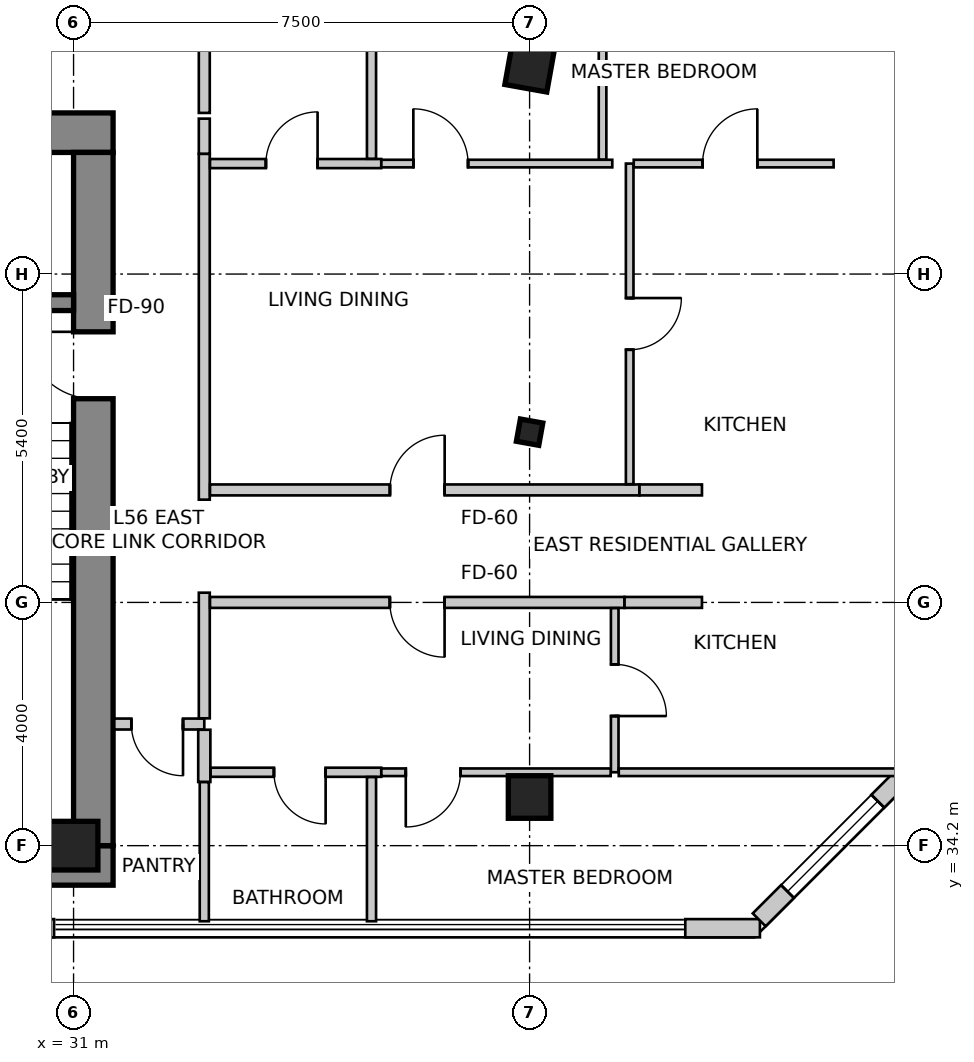
"""IFC4 building model, lengths in metres.
Left out: names, types, materials, properties, quantities, classifications, styles, units other than length and angle.
Written with IfcOpenShell. Run it as: python <this file> out.ifc"""

import sys

from ifc_helpers import new_model, si_unit, direction, frame, frame_2d, origin, origin_2d, place, context, subcontext, project, spatial, rectangle, i_section, extrude, source, transform, mapped, element, fill, save


model = new_model("IFC4")
c1 = context("Model", 3, precision=1e-05, world=origin(), true_north=direction((0.0, 1.0)))
c2 = subcontext(c1, "Body", "Model", "MODEL_VIEW")
j1 = project(units=[si_unit("LENGTHUNIT", "METRE"), si_unit("PLANEANGLEUNIT", "RADIAN")], contexts=[c1])
p1 = place(None, origin())
s1 = spatial("IfcSite", under=j1, at=p1, CompositionType="ELEMENT")
p2 = place(p1, origin())
s2 = spatial("IfcBuilding", under=s1, at=p2, CompositionType="ELEMENT")
p3 = place(p2, frame((0.0, 0.0, 221.9)))
s3 = spatial("IfcBuildingStorey", under=s2, at=p3, CompositionType="ELEMENT", Elevation=221.9)
p4 = place(p3, frame((15.95, 45.925, 0.0), z_axis=(0.0, 0.0, 1.0), x_axis=(1.0, 0.0, 0.0)))
e1 = element("IfcWall", 1, at=p4, inside=s3, PredefinedType="SHEAR", context=c2, shape_type="SweptSolid", body=[
    extrude(rectangle(XDim=15.7, YDim=0.65, at=frame_2d((7.85, 0.0))), origin(), (0.0, 0.0, 1.0), 3.5),
])
p5 = place(p3, frame((15.95, 33.875, 0.0), z_axis=(0.0, 0.0, 1.0), x_axis=(1.0, 0.0, 0.0)))
e2 = element("IfcWall", 2, at=p5, inside=s3, PredefinedType="SHEAR", context=c2, shape_type="SweptSolid", body=[
    extrude(rectangle(XDim=15.7, YDim=0.65, at=frame_2d((7.85, 0.0))), origin(), (0.0, 0.0, 1.0), 3.5),
])
m1 = source(origin(), c2, "Body", "SweptSolid", [
    extrude(rectangle(XDim=1.1, YDim=2.15, at=frame_2d((0.55, 1.075))), frame((0.0, 0.335, 0.0), z_axis=(0.0, -1.0, 0.0), x_axis=(1.0, 0.0, 0.0)), (0.0, 0.0, 1.0), 0.67),
])
p6 = place(p5, frame((10.08, 0.0, 0.0)))
e3 = element("IfcOpeningElement", 3, at=p6, cuts=e2, PredefinedType="OPENING", context=c2, shape_type="MappedRepresentation", body=[
    mapped(m1, transform((0.0, 0.0, 0.0), scale=1.0)),
])
p7 = place(p3, frame((31.325, 34.2, 0.0), z_axis=(0.0, 0.0, 1.0), x_axis=(0.0, 1.0, 0.0)))
e4 = element("IfcWall", 4, at=p7, inside=s3, PredefinedType="SHEAR", context=c2, shape_type="SweptSolid", body=[
    extrude(rectangle(XDim=11.4, YDim=0.65, at=frame_2d((5.7, 0.0))), origin(), (0.0, 0.0, 1.0), 3.5),
])
p8 = place(p7, frame((7.35, 0.0, 0.0)))
e5 = element("IfcOpeningElement", 5, at=p8, cuts=e4, PredefinedType="OPENING", context=c2, shape_type="MappedRepresentation", body=[
    mapped(m1, transform((0.0, 0.0, 0.0), scale=1.0)),
])
p9 = place(p3, frame((27.5, 43.13, 0.0), z_axis=(0.0, 0.0, 1.0), x_axis=(1.0, 0.0, 0.0)))
e6 = element("IfcWall", 6, at=p9, inside=s3, PredefinedType="SHEAR", context=c2, shape_type="SweptSolid", body=[
    extrude(rectangle(XDim=3.5, YDim=0.26, at=frame_2d((1.75, 0.0))), origin(), (0.0, 0.0, 1.0), 3.5),
])
m2 = source(origin(), c2, "Body", "SweptSolid", [
    extrude(rectangle(XDim=0.7, YDim=0.7, at=origin_2d()), origin(), (0.0, 0.0, 1.0), 3.5),
])
p10 = place(p3, frame((38.5, 47.0, 0.0), z_axis=(0.0, 0.0, 1.0), x_axis=(0.984195607969, -0.17708474032, 0.0)))
e7 = element("IfcColumn", 7, at=p10, inside=s3, PredefinedType="COLUMN", context=c2, shape_type="MappedRepresentation", body=[
    mapped(m2, transform((0.0, 0.0, 0.0), scale=1.0)),
])
m3 = source(origin(), c2, "Body", "SweptSolid", [
    extrude(rectangle(XDim=0.8, YDim=0.8, at=origin_2d()), origin(), (0.0, 0.0, 1.0), 3.5),
])
p11 = place(p3, frame((31.0, 34.2, 0.0), z_axis=(0.0, 0.0, 1.0), x_axis=(1.0, 0.0, 0.0)))
e8 = element("IfcColumn", 8, at=p11, inside=s3, PredefinedType="COLUMN", context=c2, shape_type="MappedRepresentation", body=[
    mapped(m3, transform((0.0, 0.0, 0.0), scale=1.0)),
])
p12 = place(p3, frame((38.5, 35.0, 0.0), z_axis=(0.0, 0.0, 1.0), x_axis=(1.0, 0.0, 0.0)))
e9 = element("IfcColumn", 9, at=p12, inside=s3, PredefinedType="COLUMN", context=c2, shape_type="MappedRepresentation", body=[
    mapped(m2, transform((0.0, 0.0, 0.0), scale=1.0)),
])
m4 = source(origin(), c2, "Body", "SweptSolid", [
    extrude(i_section(OverallWidth=0.374, OverallDepth=0.372, WebThickness=0.016, FlangeThickness=0.026, FilletRadius=0.015, at=origin_2d()), origin(), (0.0, 0.0, 1.0), 3.5),
])
p13 = place(p3, frame((38.5, 41.0, 0.0), z_axis=(0.0, 0.0, 1.0), x_axis=(0.984195607969, -0.17708474032, 0.0)))
e10 = element("IfcColumn", 10, at=p13, inside=s3, PredefinedType="COLUMN", context=c2, shape_type="MappedRepresentation", body=[
    mapped(m4, transform((0.0, 0.0, 0.0), scale=1.0)),
])
p14 = place(p3, frame((29.797, 32.842, 0.0), z_axis=(0.0, 0.0, 1.0), x_axis=(1.0, 0.0, 0.0)))
e11 = element("IfcWall", 11, at=p14, inside=s3, PredefinedType="SOLIDWALL", context=c2, shape_type="SweptSolid", body=[
    extrude(rectangle(XDim=0.882, YDim=0.3, at=frame_2d((0.441, 0.0))), origin(), (0.0, 0.0, 1.0), 3.25),
])
p15 = place(p3, frame((41.06, 32.842, 0.0), z_axis=(0.0, 0.0, 1.0), x_axis=(1.0, 0.0, 0.0)))
e12 = element("IfcWall", 12, at=p15, inside=s3, PredefinedType="SOLIDWALL", context=c2, shape_type="SweptSolid", body=[
    extrude(rectangle(XDim=1.228, YDim=0.3, at=frame_2d((0.614, 0.0))), origin(), (0.0, 0.0, 1.0), 3.25),
])
p16 = place(p3, frame((42.276, 32.98, 0.0), z_axis=(0.0, 0.0, 1.0), x_axis=(0.707106781187, 0.707106781187, 0.0)))
e13 = element("IfcWall", 13, at=p16, inside=s3, PredefinedType="SOLIDWALL", context=c2, shape_type="SweptSolid", body=[
    extrude(rectangle(XDim=4.922, YDim=0.3, at=frame_2d((2.461, 0.0))), origin(), (0.0, 0.0, 1.0), 3.25),
])
m5 = source(origin(), c2, "Body", "SweptSolid", [
    extrude(rectangle(XDim=2.1, YDim=2.0, at=frame_2d((1.05, 1.0))), frame((0.0, 0.16, 0.0), z_axis=(0.0, -1.0, 0.0), x_axis=(1.0, 0.0, 0.0)), (0.0, 0.0, 1.0), 0.32),
])
p17 = place(p16, frame((0.659, 0.0, 0.85)))
e14 = element("IfcOpeningElement", 14, at=p17, cuts=e13, PredefinedType="OPENING", context=c2, shape_type="MappedRepresentation", body=[
    mapped(m5, transform((0.0, 0.0, 0.0), scale=1.0)),
])
p18 = place(p3, frame((45.512, 47.268, 0.0), z_axis=(0.0, 0.0, 1.0), x_axis=(-0.707106781187, 0.707106781187, 0.0)))
e15 = element("IfcWall", 15, at=p18, inside=s3, PredefinedType="SOLIDWALL", context=c2, shape_type="SweptSolid", body=[
    extrude(rectangle(XDim=2.674, YDim=0.3, at=frame_2d((1.337, 0.0))), origin(), (0.0, 0.0, 1.0), 3.25),
])
m6 = source(origin(), c2, "Body", "SweptSolid", [
    extrude(rectangle(XDim=1.5, YDim=1.8, at=frame_2d((0.75, 0.9))), frame((0.0, 0.16, 0.0), z_axis=(0.0, -1.0, 0.0), x_axis=(1.0, 0.0, 0.0)), (0.0, 0.0, 1.0), 0.32),
])
p19 = place(p18, frame((0.587, 0.0, 0.85)))
e16 = element("IfcOpeningElement", 16, at=p19, cuts=e15, PredefinedType="OPENING", context=c2, shape_type="MappedRepresentation", body=[
    mapped(m6, transform((0.0, 0.0, 0.0), scale=1.0)),
])
p20 = place(p3, frame((33.15, 47.706, 0.0), z_axis=(0.0, 0.0, 1.0), x_axis=(0.0, -1.0, 0.0)))
e17 = element("IfcWall", 17, at=p20, inside=s3, PredefinedType="PARTITIONING", context=c2, shape_type="SweptSolid", body=[
    extrude(rectangle(XDim=1.456, YDim=0.18, at=frame_2d((0.728, 0.0))), origin(), (0.0, 0.0, 1.0), 2.934),
])
p21 = place(p3, frame((33.15, 36.2, 0.0), z_axis=(0.0, 0.0, 1.0), x_axis=(-1.0, 0.0, 0.0)))
e18 = element("IfcWall", 18, at=p21, inside=s3, PredefinedType="PARTITIONING", context=c2, shape_type="SweptSolid", body=[
    extrude(rectangle(XDim=1.48, YDim=0.18, at=frame_2d((0.74, 0.0))), origin(), (0.0, 0.0, 1.0), 3.25),
])
m7 = source(origin(), c2, "Body", "SweptSolid", [
    extrude(rectangle(XDim=0.85, YDim=2.15, at=frame_2d((0.425, 1.075))), frame((0.0, 0.1, 0.0), z_axis=(0.0, -1.0, 0.0), x_axis=(1.0, 0.0, 0.0)), (0.0, 0.0, 1.0), 0.2),
])
p22 = place(p21, frame((0.35, 0.0, 0.0)))
e19 = element("IfcOpeningElement", 19, at=p22, cuts=e18, PredefinedType="OPENING", context=c2, shape_type="MappedRepresentation", body=[
    mapped(m7, transform((0.0, 0.0, 0.0), scale=1.0)),
])
p23 = place(p3, frame((33.15, 45.577, 0.0), z_axis=(0.0, 0.0, 1.0), x_axis=(0.0, -1.0, 0.0)))
e20 = element("IfcWall", 20, at=p23, inside=s3, PredefinedType="PARTITIONING", context=c2, shape_type="SweptSolid", body=[
    extrude(rectangle(XDim=5.687, YDim=0.18, at=frame_2d((2.844, 0.0))), origin(), (0.0, 0.0, 1.0), 2.822),
])
p24 = place(p3, frame((33.15, 46.156, 0.0), z_axis=(0.0, 0.0, 1.0), x_axis=(0.0, -1.0, 0.0)))
e21 = element("IfcWall", 21, at=p24, inside=s3, PredefinedType="PARTITIONING", context=c2, shape_type="SweptSolid", body=[
    extrude(rectangle(XDim=0.577, YDim=0.18, at=frame_2d((0.289, 0.0))), origin(), (0.0, 0.0, 1.0), 2.822),
])
p25 = place(p3, frame((33.15, 38.36, 0.0), z_axis=(0.0, 0.0, 1.0), x_axis=(0.0, -1.0, 0.0)))
e22 = element("IfcWall", 22, at=p25, inside=s3, PredefinedType="PARTITIONING", context=c2, shape_type="SweptSolid", body=[
    extrude(rectangle(XDim=2.066, YDim=0.18, at=frame_2d((1.033, 0.0))), origin(), (0.0, 0.0, 1.0), 3.25),
])
p26 = place(p3, frame((33.244, 40.05, 0.0), z_axis=(0.0, 0.0, 1.0), x_axis=(1.0, 0.0, 0.0)))
e23 = element("IfcWall", 23, at=p26, inside=s3, PredefinedType="PARTITIONING", context=c2, shape_type="SweptSolid", body=[
    extrude(rectangle(XDim=7.062, YDim=0.18, at=frame_2d((3.531, 0.0))), origin(), (0.0, 0.0, 1.0), 2.766),
])
m8 = source(origin(), c2, "Body", "SweptSolid", [
    extrude(rectangle(XDim=0.9, YDim=2.15, at=frame_2d((0.45, 1.075))), frame((0.0, 0.1, 0.0), z_axis=(0.0, -1.0, 0.0), x_axis=(1.0, 0.0, 0.0)), (0.0, 0.0, 1.0), 0.2),
])
p27 = place(p26, frame((2.959, 0.0, 0.0)))
e24 = element("IfcOpeningElement", 24, at=p27, cuts=e23, PredefinedType="OPENING", context=c2, shape_type="MappedRepresentation", body=[
    mapped(m8, transform((0.0, 0.0, 0.0), scale=1.0)),
])
p28 = place(p3, frame((40.308, 40.05, 0.0), z_axis=(0.0, 0.0, 1.0), x_axis=(1.0, 0.0, 0.0)))
e25 = element("IfcWall", 25, at=p28, inside=s3, PredefinedType="PARTITIONING", context=c2, shape_type="SweptSolid", body=[
    extrude(rectangle(XDim=1.027, YDim=0.18, at=frame_2d((0.513, 0.0))), origin(), (0.0, 0.0, 1.0), 3.25),
])
p29 = place(p3, frame((40.06, 38.2, 0.0), z_axis=(0.0, 0.0, 1.0), x_axis=(-1.0, 0.0, 0.0)))
e26 = element("IfcWall", 26, at=p29, inside=s3, PredefinedType="PARTITIONING", context=c2, shape_type="SweptSolid", body=[
    extrude(rectangle(XDim=6.816, YDim=0.18, at=frame_2d((3.408, 0.0))), origin(), (0.0, 0.0, 1.0), 2.766),
])
p30 = place(p29, frame((2.958, 0.0, 0.0)))
e27 = element("IfcOpeningElement", 27, at=p30, cuts=e26, PredefinedType="OPENING", context=c2, shape_type="MappedRepresentation", body=[
    mapped(m8, transform((0.0, 0.0, 0.0), scale=1.0)),
])
p31 = place(p3, frame((41.335, 38.2, 0.0), z_axis=(0.0, 0.0, 1.0), x_axis=(-1.0, 0.0, 0.0)))
e28 = element("IfcWall", 28, at=p31, inside=s3, PredefinedType="PARTITIONING", context=c2, shape_type="SweptSolid", body=[
    extrude(rectangle(XDim=1.273, YDim=0.18, at=frame_2d((0.636, 0.0))), origin(), (0.0, 0.0, 1.0), 3.25),
])
p32 = place(p3, frame((33.15, 36.106, 0.0), z_axis=(0.0, 0.0, 1.0), x_axis=(0.0, -1.0, 0.0)))
e29 = element("IfcWall", 29, at=p32, inside=s3, PredefinedType="PARTITIONING", context=c2, shape_type="SweptSolid", body=[
    extrude(rectangle(XDim=0.859, YDim=0.2, at=frame_2d((0.429, 0.0))), origin(), (0.0, 0.0, 1.0), 3.25),
])
p33 = place(p3, frame((33.15, 35.245, 0.0), z_axis=(0.0, 0.0, 1.0), x_axis=(0.0, -1.0, 0.0)))
e30 = element("IfcWall", 30, at=p33, inside=s3, PredefinedType="PARTITIONING", context=c2, shape_type="SweptSolid", body=[
    extrude(rectangle(XDim=2.288, YDim=0.15, at=frame_2d((1.144, 0.0))), origin(), (0.0, 0.0, 1.0), 3.25),
])
p34 = place(p3, frame((40.146, 45.417, 0.0), z_axis=(0.0, 0.0, 1.0), x_axis=(0.0, -1.0, 0.0)))
e31 = element("IfcWall", 31, at=p34, inside=s3, PredefinedType="PARTITIONING", context=c2, shape_type="SweptSolid", body=[
    extrude(rectangle(XDim=5.273, YDim=0.125, at=frame_2d((2.636, 0.0))), origin(), (0.0, 0.0, 1.0), 3.25),
])
m9 = source(origin(), c2, "Body", "SweptSolid", [
    extrude(rectangle(XDim=0.85, YDim=2.15, at=frame_2d((0.425, 1.075))), frame((0.0, 0.073, 0.0), z_axis=(0.0, -1.0, 0.0), x_axis=(1.0, 0.0, 0.0)), (0.0, 0.0, 1.0), 0.145),
])
p35 = place(p34, frame((2.211, 0.0, 0.0)))
e32 = element("IfcOpeningElement", 32, at=p35, cuts=e31, PredefinedType="OPENING", context=c2, shape_type="MappedRepresentation", body=[
    mapped(m9, transform((0.0, 0.0, 0.0), scale=1.0)),
])
p36 = place(p3, frame((33.244, 45.417, 0.0), z_axis=(0.0, 0.0, 1.0), x_axis=(1.0, 0.0, 0.0)))
e33 = element("IfcWall", 33, at=p36, inside=s3, PredefinedType="PARTITIONING", context=c2, shape_type="SweptSolid", body=[
    extrude(rectangle(XDim=2.816, YDim=0.15, at=frame_2d((1.408, 0.0))), origin(), (0.0, 0.0, 1.0), 2.934),
])
m10 = source(origin(), c2, "Body", "SweptSolid", [
    extrude(rectangle(XDim=0.85, YDim=2.15, at=frame_2d((0.425, 1.075))), frame((0.0, 0.085, 0.0), z_axis=(0.0, -1.0, 0.0), x_axis=(1.0, 0.0, 0.0)), (0.0, 0.0, 1.0), 0.17),
])
p37 = place(p36, frame((0.919, 0.0, 0.0)))
e34 = element("IfcOpeningElement", 34, at=p37, cuts=e33, PredefinedType="OPENING", context=c2, shape_type="MappedRepresentation", body=[
    mapped(m10, transform((0.0, 0.0, 0.0), scale=1.0)),
])
p38 = place(p3, frame((36.062, 45.417, 0.0), z_axis=(0.0, 0.0, 1.0), x_axis=(1.0, 0.0, 0.0)))
e35 = element("IfcWall", 35, at=p38, inside=s3, PredefinedType="PARTITIONING", context=c2, shape_type="SweptSolid", body=[
    extrude(rectangle(XDim=3.798, YDim=0.125, at=frame_2d((1.899, 0.0))), origin(), (0.0, 0.0, 1.0), 2.766),
])
m11 = source(origin(), c2, "Body", "SweptSolid", [
    extrude(rectangle(XDim=0.9, YDim=2.15, at=frame_2d((0.45, 1.075))), frame((0.0, 0.073, 0.0), z_axis=(0.0, -1.0, 0.0), x_axis=(1.0, 0.0, 0.0)), (0.0, 0.0, 1.0), 0.145),
])
p39 = place(p38, frame((0.526, 0.0, 0.0)))
e36 = element("IfcOpeningElement", 36, at=p39, cuts=e35, PredefinedType="OPENING", context=c2, shape_type="MappedRepresentation", body=[
    mapped(m11, transform((0.0, 0.0, 0.0), scale=1.0)),
])
p40 = place(p3, frame((40.212, 45.417, 0.0), z_axis=(0.0, 0.0, 1.0), x_axis=(1.0, 0.0, 0.0)))
e37 = element("IfcWall", 37, at=p40, inside=s3, PredefinedType="PARTITIONING", context=c2, shape_type="SweptSolid", body=[
    extrude(rectangle(XDim=3.288, YDim=0.125, at=frame_2d((1.644, 0.0))), origin(), (0.0, 0.0, 1.0), 3.25),
])
p41 = place(p40, frame((1.133, 0.0, 0.0)))
e38 = element("IfcOpeningElement", 38, at=p41, cuts=e37, PredefinedType="OPENING", context=c2, shape_type="MappedRepresentation", body=[
    mapped(m11, transform((0.0, 0.0, 0.0), scale=1.0)),
])
p42 = place(p3, frame((35.9, 50.303, 0.0), z_axis=(0.0, 0.0, 1.0), x_axis=(0.0, -1.0, 0.0)))
e39 = element("IfcWall", 39, at=p42, inside=s3, PredefinedType="PARTITIONING", context=c2, shape_type="SweptSolid", body=[
    extrude(rectangle(XDim=4.807, YDim=0.15, at=frame_2d((2.403, 0.0))), origin(), (0.0, 0.0, 1.0), 2.542),
])
p43 = place(p3, frame((39.7, 49.639, 0.0), z_axis=(0.0, 0.0, 1.0), x_axis=(0.0, -1.0, 0.0)))
e40 = element("IfcWall", 40, at=p43, inside=s3, PredefinedType="PARTITIONING", context=c2, shape_type="SweptSolid", body=[
    extrude(rectangle(XDim=4.156, YDim=0.125, at=frame_2d((2.078, 0.0))), origin(), (0.0, 0.0, 1.0), 3.25),
])
p44 = place(p3, frame((39.9, 38.106, 0.0), z_axis=(0.0, 0.0, 1.0), x_axis=(0.0, -1.0, 0.0)))
e41 = element("IfcWall", 41, at=p44, inside=s3, PredefinedType="PARTITIONING", context=c2, shape_type="SweptSolid", body=[
    extrude(rectangle(XDim=2.699, YDim=0.125, at=frame_2d((1.35, 0.0))), origin(), (0.0, 0.0, 1.0), 3.25),
])
p45 = place(p44, frame((0.925, 0.0, 0.0)))
e42 = element("IfcOpeningElement", 42, at=p45, cuts=e41, PredefinedType="OPENING", context=c2, shape_type="MappedRepresentation", body=[
    mapped(m9, transform((0.0, 0.0, 0.0), scale=1.0)),
])
p46 = place(p3, frame((36.06, 35.407, 0.0), z_axis=(0.0, 0.0, 1.0), x_axis=(-1.0, 0.0, 0.0)))
e43 = element("IfcWall", 43, at=p46, inside=s3, PredefinedType="PARTITIONING", context=c2, shape_type="SweptSolid", body=[
    extrude(rectangle(XDim=2.806, YDim=0.15, at=frame_2d((1.403, 0.0))), origin(), (0.0, 0.0, 1.0), 3.25),
])
p47 = place(p46, frame((0.915, 0.0, 0.0)))
e44 = element("IfcOpeningElement", 44, at=p47, cuts=e43, PredefinedType="OPENING", context=c2, shape_type="MappedRepresentation", body=[
    mapped(m10, transform((0.0, 0.0, 0.0), scale=1.0)),
])
p48 = place(p3, frame((39.833, 35.407, 0.0), z_axis=(0.0, 0.0, 1.0), x_axis=(-1.0, 0.0, 0.0)))
e45 = element("IfcWall", 45, at=p48, inside=s3, PredefinedType="PARTITIONING", context=c2, shape_type="SweptSolid", body=[
    extrude(rectangle(XDim=3.771, YDim=0.125, at=frame_2d((1.886, 0.0))), origin(), (0.0, 0.0, 1.0), 2.766),
])
p49 = place(p48, frame((2.47, 0.0, 0.0)))
e46 = element("IfcOpeningElement", 46, at=p49, cuts=e45, PredefinedType="OPENING", context=c2, shape_type="MappedRepresentation", body=[
    mapped(m11, transform((0.0, 0.0, 0.0), scale=1.0)),
])
p50 = place(p3, frame((44.54, 35.407, 0.0), z_axis=(0.0, 0.0, 1.0), x_axis=(-1.0, 0.0, 0.0)))
e47 = element("IfcWall", 47, at=p50, inside=s3, PredefinedType="PARTITIONING", context=c2, shape_type="SweptSolid", body=[
    extrude(rectangle(XDim=4.574, YDim=0.125, at=frame_2d((2.287, 0.0))), origin(), (0.0, 0.0, 1.0), 3.25),
])
p51 = place(p3, frame((35.9, 35.328, 0.0), z_axis=(0.0, 0.0, 1.0), x_axis=(0.0, -1.0, 0.0)))
e48 = element("IfcWall", 48, at=p51, inside=s3, PredefinedType="PARTITIONING", context=c2, shape_type="SweptSolid", body=[
    extrude(rectangle(XDim=2.371, YDim=0.15, at=frame_2d((1.186, 0.0))), origin(), (0.0, 0.0, 1.0), 3.25),
])
m12 = source(origin(), c2, "Body", "SweptSolid", [
    extrude(rectangle(XDim=2.1, YDim=2.0, at=frame_2d((1.05, 1.0))), frame((0.0, -0.015, 0.0), z_axis=(0.0, -1.0, 0.0), x_axis=(1.0, 0.0, 0.0)), (0.0, 0.0, 1.0), 0.06),
])
p52 = place(p17, origin())
e49 = element("IfcWindow", 49, at=p52, inside=s3, PartitioningType="SINGLE_PANEL", PredefinedType="WINDOW", context=c2, shape_type="MappedRepresentation", body=[
    mapped(m12, transform((0.0, 0.0, 0.0), scale=1.0)),
])
fill(e14, e49)
m13 = source(origin(), c2, "Body", "SweptSolid", [
    extrude(rectangle(XDim=1.1, YDim=2.15, at=frame_2d((0.55, 1.075))), frame((0.0, 0.025, 0.0), z_axis=(0.0, -1.0, 0.0), x_axis=(1.0, 0.0, 0.0)), (0.0, 0.0, 1.0), 0.05),
])
p53 = place(p8, origin())
e50 = element("IfcDoor", 50, at=p53, inside=s3, OperationType="SINGLE_SWING_RIGHT", PredefinedType="DOOR", context=c2, shape_type="MappedRepresentation", body=[
    mapped(m13, transform((0.0, 0.0, 0.0), scale=1.0)),
])
fill(e5, e50)
m14 = source(origin(), c2, "Body", "SweptSolid", [
    extrude(rectangle(XDim=0.85, YDim=2.15, at=frame_2d((0.425, 1.075))), frame((0.0, 0.025, 0.0), z_axis=(0.0, -1.0, 0.0), x_axis=(1.0, 0.0, 0.0)), (0.0, 0.0, 1.0), 0.05),
])
p54 = place(p22, origin())
e51 = element("IfcDoor", 51, at=p54, inside=s3, OperationType="SINGLE_SWING_LEFT", PredefinedType="DOOR", context=c2, shape_type="MappedRepresentation", body=[
    mapped(m14, transform((0.0, 0.0, 0.0), scale=1.0)),
])
fill(e19, e51)
m15 = source(origin(), c2, "Body", "SweptSolid", [
    extrude(rectangle(XDim=0.9, YDim=2.15, at=frame_2d((0.45, 1.075))), frame((0.0, 0.025, 0.0), z_axis=(0.0, -1.0, 0.0), x_axis=(1.0, 0.0, 0.0)), (0.0, 0.0, 1.0), 0.05),
])
p55 = place(p27, origin())
e52 = element("IfcDoor", 52, at=p55, inside=s3, OperationType="SINGLE_SWING_RIGHT", PredefinedType="DOOR", context=c2, shape_type="MappedRepresentation", body=[
    mapped(m15, transform((0.0, 0.0, 0.0), scale=1.0)),
])
fill(e24, e52)
p56 = place(p35, origin())
e53 = element("IfcDoor", 53, at=p56, inside=s3, OperationType="SINGLE_SWING_LEFT", PredefinedType="DOOR", context=c2, shape_type="MappedRepresentation", body=[
    mapped(m14, transform((0.0, 0.0, 0.0), scale=1.0)),
])
fill(e32, e53)
p57 = place(p37, origin())
e54 = element("IfcDoor", 54, at=p57, inside=s3, OperationType="SINGLE_SWING_RIGHT", PredefinedType="DOOR", context=c2, shape_type="MappedRepresentation", body=[
    mapped(m14, transform((0.0, 0.0, 0.0), scale=1.0)),
])
fill(e34, e54)
m16 = source(origin(), c2, "Body", "SweptSolid", [
    extrude(rectangle(XDim=0.9, YDim=2.15, at=frame_2d((0.45, 1.075))), frame((0.0, 0.025, 0.0), z_axis=(0.0, -1.0, 0.0), x_axis=(1.0, 0.0, 0.0)), (0.0, 0.0, 1.0), 0.05),
])
p58 = place(p39, origin())
e55 = element("IfcDoor", 55, at=p58, inside=s3, OperationType="SINGLE_SWING_LEFT", PredefinedType="DOOR", context=c2, shape_type="MappedRepresentation", body=[
    mapped(m16, transform((0.0, 0.0, 0.0), scale=1.0)),
])
fill(e36, e55)
p59 = place(p41, origin())
e56 = element("IfcDoor", 56, at=p59, inside=s3, OperationType="SINGLE_SWING_RIGHT", PredefinedType="DOOR", context=c2, shape_type="MappedRepresentation", body=[
    mapped(m16, transform((0.0, 0.0, 0.0), scale=1.0)),
])
fill(e38, e56)
p60 = place(p30, origin())
e57 = element("IfcDoor", 57, at=p60, inside=s3, OperationType="SINGLE_SWING_LEFT", PredefinedType="DOOR", context=c2, shape_type="MappedRepresentation", body=[
    mapped(m15, transform((0.0, 0.0, 0.0), scale=1.0)),
])
fill(e27, e57)
p61 = place(p45, origin())
e58 = element("IfcDoor", 58, at=p61, inside=s3, OperationType="SINGLE_SWING_RIGHT", PredefinedType="DOOR", context=c2, shape_type="MappedRepresentation", body=[
    mapped(m14, transform((0.0, 0.0, 0.0), scale=1.0)),
])
fill(e42, e58)
p62 = place(p47, origin())
e59 = element("IfcDoor", 59, at=p62, inside=s3, OperationType="SINGLE_SWING_LEFT", PredefinedType="DOOR", context=c2, shape_type="MappedRepresentation", body=[
    mapped(m14, transform((0.0, 0.0, 0.0), scale=1.0)),
])
fill(e44, e59)
p63 = place(p49, origin())
e60 = element("IfcDoor", 60, at=p63, inside=s3, OperationType="SINGLE_SWING_RIGHT", PredefinedType="DOOR", context=c2, shape_type="MappedRepresentation", body=[
    mapped(m16, transform((0.0, 0.0, 0.0), scale=1.0)),
])
fill(e46, e60)
save(model, sys.argv[1])
